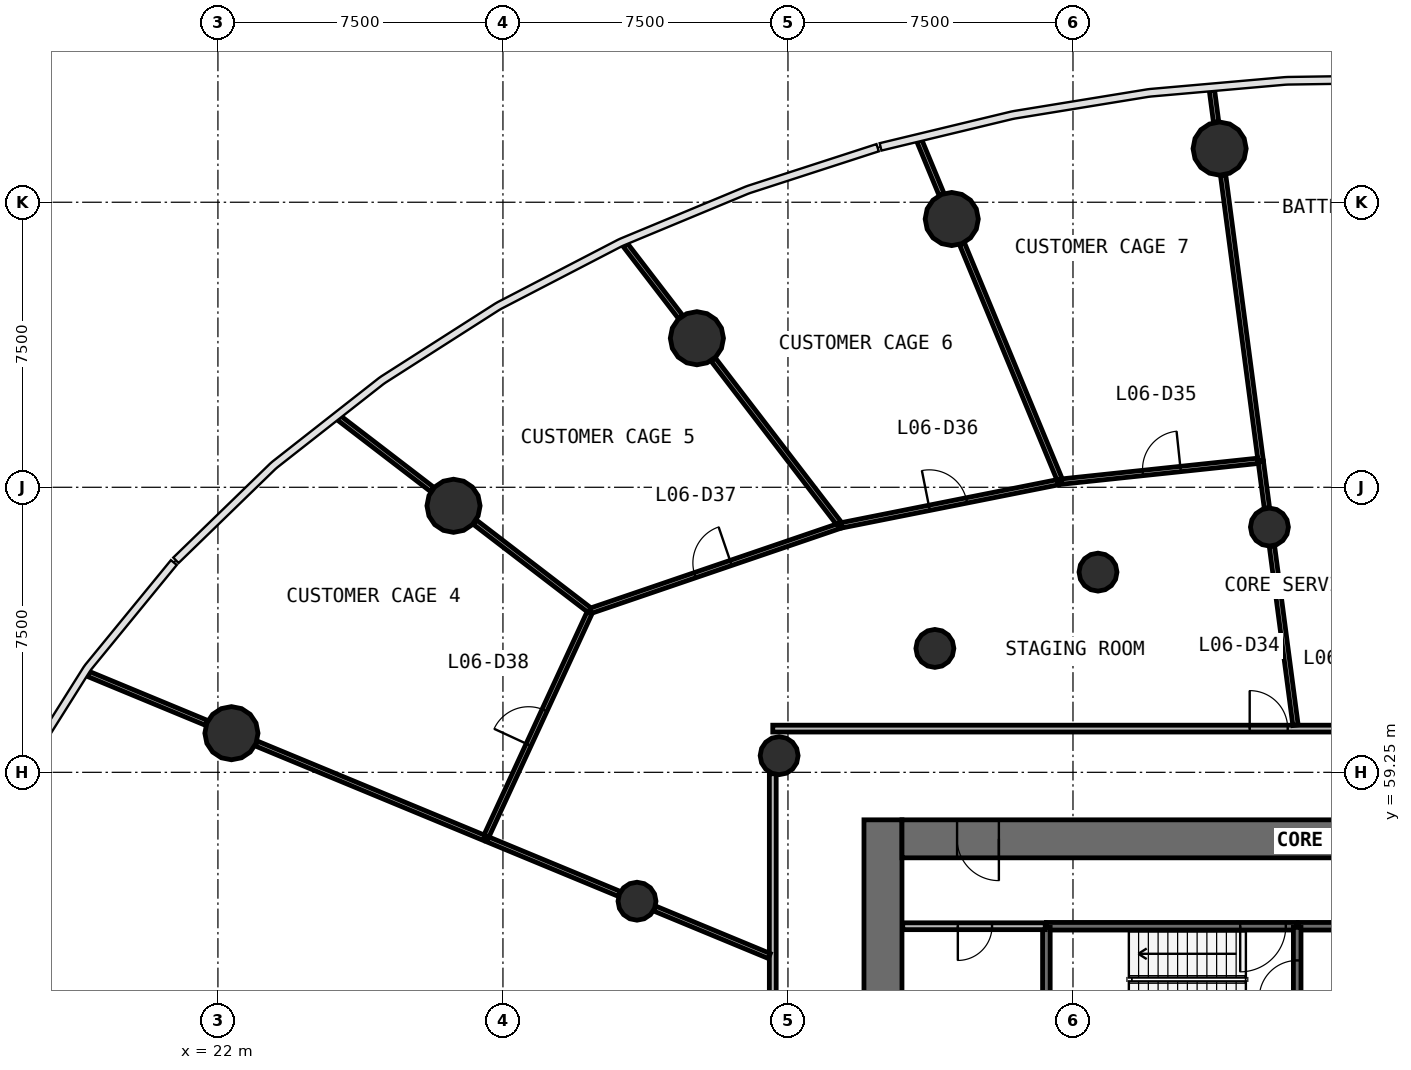
"""IFC4 building model, lengths in metres.
Left out: names, types, materials, properties, quantities, classifications, styles, units other than length and angle.
Written with IfcOpenShell. Run it as: python <this file> out.ifc"""

import sys

from ifc_helpers import new_model, si_unit, direction, frame, frame_2d, origin, origin_2d, place, context, subcontext, project, spatial, rectangle, circle, extrude, source, transform, mapped, element, fill, save


model = new_model("IFC4")
c1 = context("Model", 3, precision=1e-05, world=origin(), true_north=direction((0.0, 1.0)))
c2 = subcontext(c1, "Body", "Model", "MODEL_VIEW")
j1 = project(units=[si_unit("LENGTHUNIT", "METRE"), si_unit("PLANEANGLEUNIT", "RADIAN")], contexts=[c1])
p1 = place(None, origin())
s1 = spatial("IfcSite", under=j1, at=p1, CompositionType="ELEMENT")
p2 = place(p1, origin())
s2 = spatial("IfcBuilding", under=s1, at=p2, CompositionType="ELEMENT")
p3 = place(p2, frame((0.0, 0.0, 27.0)))
s3 = spatial("IfcBuildingStorey", under=s2, at=p3, CompositionType="ELEMENT", Elevation=27.0)
p4 = place(p3, frame((39.5, 58.0, 0.0), z_axis=(0.0, 0.0, 1.0), x_axis=(0.0, -1.0, 0.0)))
e1 = element("IfcWall", 1, at=p4, inside=s3, PredefinedType="SHEAR", context=c2, shape_type="SweptSolid", body=[
    extrude(rectangle(XDim=20.0, YDim=1.0, at=frame_2d((10.0, 0.0))), origin(), (0.0, 0.0, 1.0), 4.4),
])
p5 = place(p4, frame((9.1, 0.0, 0.0)))
e2 = element("IfcOpeningElement", 2, at=p5, cuts=e1, PredefinedType="OPENING", context=c2, shape_type="SweptSolid", body=[
    extrude(rectangle(XDim=1.8, YDim=2.1, at=frame_2d((0.9, 1.05))), frame((0.0, 0.51, 0.0), z_axis=(0.0, -1.0, 0.0), x_axis=(1.0, 0.0, 0.0)), (0.0, 0.0, 1.0), 1.02),
])
p6 = place(p3, frame((64.0, 57.5, 0.0), z_axis=(0.0, 0.0, 1.0), x_axis=(-1.0, 0.0, 0.0)))
e3 = element("IfcWall", 3, at=p6, inside=s3, PredefinedType="SHEAR", context=c2, shape_type="SweptSolid", body=[
    extrude(rectangle(XDim=24.0, YDim=1.0, at=frame_2d((12.0, 0.0))), origin(), (0.0, 0.0, 1.0), 4.4),
])
p7 = place(p6, frame((21.45, 0.0, 0.0)))
e4 = element("IfcOpeningElement", 4, at=p7, cuts=e3, PredefinedType="OPENING", context=c2, shape_type="SweptSolid", body=[
    extrude(rectangle(XDim=1.1, YDim=2.1, at=frame_2d((0.55, 1.05))), frame((0.0, 0.51, 0.0), z_axis=(0.0, -1.0, 0.0), x_axis=(1.0, 0.0, 0.0)), (0.0, 0.0, 1.0), 1.02),
])
p8 = place(p6, frame((1.95, 0.0, 0.0)))
e5 = element("IfcOpeningElement", 5, at=p8, cuts=e3, PredefinedType="OPENING", context=c2, shape_type="SweptSolid", body=[
    extrude(rectangle(XDim=1.1, YDim=2.1, at=frame_2d((0.55, 1.05))), frame((0.0, 0.51, 0.0), z_axis=(0.0, -1.0, 0.0), x_axis=(1.0, 0.0, 0.0)), (0.0, 0.0, 1.0), 1.02),
])
m1 = source(origin(), c2, "Body", "SweptSolid", [
    extrude(circle(Radius=0.7, at=origin_2d()), origin(), (0.0, 0.0, 1.0), 4.4),
])
for number, where, z_axis, x_axis in (
    (6, (48.358, 75.661, 0.0), (0.0, 0.0, 1.0), (1.0, 0.0, 0.0)),
    (7, (41.31, 73.809, 0.0), (0.0, 0.0, 1.0), (1.0, 0.0, 0.0)),
    (8, (34.604, 70.672, 0.0), (0.0, 0.0, 1.0), (1.0, 0.0, 0.0)),
    (9, (28.199, 66.263, 0.0), (0.0, 0.0, 1.0), (1.0, 0.0, 0.0)),
    (10, (22.355, 60.279, 0.0), (0.0, 0.0, 1.0), (1.0, 0.0, 0.0)),
):
    element("IfcColumn", number, at=place(p3, frame(where, z_axis=z_axis, x_axis=x_axis)), inside=s3, PredefinedType="COLUMN", context=c2, shape_type="MappedRepresentation", body=[
        mapped(m1, transform((0.0, 0.0, 0.0), scale=1.0)),
    ])
m2 = source(origin(), c2, "Body", "SweptSolid", [
    extrude(circle(Radius=0.5, at=origin_2d()), origin(), (0.0, 0.0, 1.0), 4.4),
])
for number, where, z_axis, x_axis in (
    (11, (49.669, 65.703, 0.0), (0.0, 0.0, 1.0), (1.0, 0.0, 0.0)),
    (12, (45.158, 64.518, 0.0), (0.0, 0.0, 1.0), (1.0, 0.0, 0.0)),
    (13, (40.866, 62.51, 0.0), (0.0, 0.0, 1.0), (1.0, 0.0, 0.0)),
    (14, (36.768, 59.688, 0.0), (0.0, 0.0, 1.0), (1.0, 0.0, 0.0)),
    (15, (33.028, 55.859, 0.0), (0.0, 0.0, 1.0), (1.0, 0.0, 0.0)),
):
    element("IfcColumn", number, at=place(p3, frame(where, z_axis=z_axis, x_axis=x_axis)), inside=s3, PredefinedType="COLUMN", context=c2, shape_type="MappedRepresentation", body=[
        mapped(m2, transform((0.0, 0.0, 0.0), scale=1.0)),
    ])
p9 = place(p3, frame((50.4, 55.2, 0.0), z_axis=(0.0, 0.0, 1.0), x_axis=(-1.0, 0.0, 0.0)))
e16 = element("IfcWall", 16, at=p9, inside=s3, PredefinedType="SOLIDWALL", context=c2, shape_type="SweptSolid", body=[
    extrude(rectangle(XDim=6.6, YDim=0.2, at=frame_2d((3.3, 0.0))), origin(), (0.0, 0.0, 1.0), 3.95),
])
p10 = place(p9, frame((0.3, 0.0, 0.0)))
e17 = element("IfcOpeningElement", 17, at=p10, cuts=e16, PredefinedType="OPENING", context=c2, shape_type="SweptSolid", body=[
    extrude(rectangle(XDim=1.2, YDim=2.1, at=frame_2d((0.6, 1.05))), frame((0.0, 0.11, 0.0), z_axis=(0.0, -1.0, 0.0), x_axis=(1.0, 0.0, 0.0)), (0.0, 0.0, 1.0), 0.22),
])
p11 = place(p3, frame((56.1, 55.2, 0.0), z_axis=(0.0, 0.0, 1.0), x_axis=(-1.0, 0.0, 0.0)))
e18 = element("IfcWall", 18, at=p11, inside=s3, PredefinedType="SOLIDWALL", context=c2, shape_type="SweptSolid", body=[
    extrude(rectangle(XDim=5.67, YDim=0.2, at=frame_2d((2.835, 0.0))), origin(), (0.0, 0.0, 1.0), 3.95),
])
p12 = place(p11, frame((2.95, 0.0, 0.0)))
e19 = element("IfcOpeningElement", 19, at=p12, cuts=e18, PredefinedType="OPENING", context=c2, shape_type="SweptSolid", body=[
    extrude(rectangle(XDim=1.1, YDim=2.1, at=frame_2d((0.55, 1.05))), frame((0.0, 0.11, 0.0), z_axis=(0.0, -1.0, 0.0), x_axis=(1.0, 0.0, 0.0)), (0.0, 0.0, 1.0), 0.22),
])
p13 = place(p3, frame((50.4, 52.4, 0.0), z_axis=(0.0, 0.0, 1.0), x_axis=(0.0, 1.0, 0.0)))
e20 = element("IfcWall", 20, at=p13, inside=s3, PredefinedType="SOLIDWALL", context=c2, shape_type="SweptSolid", body=[
    extrude(rectangle(XDim=2.77, YDim=0.2, at=frame_2d((1.385, 0.0))), origin(), (0.0, 0.0, 1.0), 3.95),
])
p14 = place(p13, frame((0.9, 0.0, 0.0)))
e21 = element("IfcOpeningElement", 21, at=p14, cuts=e20, PredefinedType="OPENING", context=c2, shape_type="SweptSolid", body=[
    extrude(rectangle(XDim=1.0, YDim=2.1, at=frame_2d((0.5, 1.05))), frame((0.0, 0.11, 0.0), z_axis=(0.0, -1.0, 0.0), x_axis=(1.0, 0.0, 0.0)), (0.0, 0.0, 1.0), 0.22),
])
p15 = place(p3, frame((43.8, 55.17, 0.0), z_axis=(0.0, 0.0, 1.0), x_axis=(0.0, -1.0, 0.0)))
e22 = element("IfcWall", 22, at=p15, inside=s3, PredefinedType="SOLIDWALL", context=c2, shape_type="SweptSolid", body=[
    extrude(rectangle(XDim=2.14, YDim=0.2, at=frame_2d((1.07, 0.0))), origin(), (0.0, 0.0, 1.0), 3.95),
])
p16 = place(p3, frame((36.6, 60.4, 0.0), z_axis=(0.0, 0.0, 1.0), x_axis=(1.0, 0.0, 0.0)))
e23 = element("IfcWall", 23, at=p16, inside=s3, PredefinedType="PARTITIONING", context=c2, shape_type="SweptSolid", body=[
    extrude(rectangle(XDim=30.8, YDim=0.18, at=frame_2d((15.4, 0.0))), origin(), (0.0, 0.0, 1.0), 3.05),
])
p17 = place(p16, frame((17.35, 0.0, 0.0)))
e24 = element("IfcOpeningElement", 24, at=p17, cuts=e23, PredefinedType="OPENING", context=c2, shape_type="SweptSolid", body=[
    extrude(rectangle(XDim=1.0, YDim=2.1, at=frame_2d((0.5, 1.05))), frame((0.0, 0.1, 0.0), z_axis=(0.0, -1.0, 0.0), x_axis=(1.0, 0.0, 0.0)), (0.0, 0.0, 1.0), 0.2),
])
p18 = place(p16, frame((14.95, 0.0, 0.0)))
e25 = element("IfcOpeningElement", 25, at=p18, cuts=e23, PredefinedType="OPENING", context=c2, shape_type="SweptSolid", body=[
    extrude(rectangle(XDim=1.0, YDim=2.1, at=frame_2d((0.5, 1.05))), frame((0.0, 0.1, 0.0), z_axis=(0.0, -1.0, 0.0), x_axis=(1.0, 0.0, 0.0)), (0.0, 0.0, 1.0), 0.2),
])
p19 = place(p16, frame((12.55, 0.0, 0.0)))
e26 = element("IfcOpeningElement", 26, at=p19, cuts=e23, PredefinedType="OPENING", context=c2, shape_type="SweptSolid", body=[
    extrude(rectangle(XDim=1.0, YDim=2.1, at=frame_2d((0.5, 1.05))), frame((0.0, 0.1, 0.0), z_axis=(0.0, -1.0, 0.0), x_axis=(1.0, 0.0, 0.0)), (0.0, 0.0, 1.0), 0.2),
])
p20 = place(p3, frame((36.6, 35.63, 0.0), z_axis=(0.0, 0.0, 1.0), x_axis=(0.0, 1.0, 0.0)))
e27 = element("IfcWall", 27, at=p20, inside=s3, PredefinedType="PARTITIONING", context=c2, shape_type="SweptSolid", body=[
    extrude(rectangle(XDim=23.583, YDim=0.18, at=frame_2d((11.791, 0.0))), origin(), (0.0, 0.0, 1.0), 3.05),
])
p21 = place(p20, frame((11.333, 0.0, 0.0)))
e28 = element("IfcOpeningElement", 28, at=p21, cuts=e27, PredefinedType="OPENING", context=c2, shape_type="SweptSolid", body=[
    extrude(rectangle(XDim=1.0, YDim=2.1, at=frame_2d((0.5, 1.05))), frame((0.0, 0.1, 0.0), z_axis=(0.0, -1.0, 0.0), x_axis=(1.0, 0.0, 0.0)), (0.0, 0.0, 1.0), 0.2),
])
p22 = place(p20, frame((9.133, 0.0, 0.0)))
e29 = element("IfcOpeningElement", 29, at=p22, cuts=e27, PredefinedType="OPENING", context=c2, shape_type="SweptSolid", body=[
    extrude(rectangle(XDim=1.0, YDim=2.1, at=frame_2d((0.5, 1.05))), frame((0.0, 0.1, 0.0), z_axis=(0.0, -1.0, 0.0), x_axis=(1.0, 0.0, 0.0)), (0.0, 0.0, 1.0), 0.2),
])
p23 = place(p3, frame((43.77, 55.2, 0.0), z_axis=(0.0, 0.0, 1.0), x_axis=(-1.0, 0.0, 0.0)))
e30 = element("IfcWall", 30, at=p23, inside=s3, PredefinedType="PARTITIONING", context=c2, shape_type="SweptSolid", body=[
    extrude(rectangle(XDim=3.75, YDim=0.18, at=frame_2d((1.875, 0.0))), origin(), (0.0, 0.0, 1.0), 3.95),
])
p24 = place(p23, frame((1.4, 0.0, 0.0)))
e31 = element("IfcOpeningElement", 31, at=p24, cuts=e30, PredefinedType="OPENING", context=c2, shape_type="SweptSolid", body=[
    extrude(rectangle(XDim=0.9, YDim=2.1, at=frame_2d((0.45, 1.05))), frame((0.0, 0.1, 0.0), z_axis=(0.0, -1.0, 0.0), x_axis=(1.0, 0.0, 0.0)), (0.0, 0.0, 1.0), 0.2),
])
p25 = place(p3, frame((49.439, 67.454, 0.0), z_axis=(0.0, 0.0, 1.0), x_axis=(-0.130518718584, 0.991445845268, 0.0)))
e32 = element("IfcWall", 32, at=p25, inside=s3, PredefinedType="PARTITIONING", context=c2, shape_type="SweptSolid", body=[
    extrude(rectangle(XDim=7.574, YDim=0.14, at=frame_2d((3.787, 0.0))), origin(), (0.0, 0.0, 1.0), 3.05),
])
p26 = place(p3, frame((31.802, 63.498, 0.0), z_axis=(0.0, 0.0, 1.0), x_axis=(0.946437795965, 0.322886200337, 0.0)))
e33 = element("IfcWall", 33, at=p26, inside=s3, PredefinedType="PARTITIONING", context=c2, shape_type="SweptSolid", body=[
    extrude(rectangle(XDim=6.955, YDim=0.14, at=frame_2d((3.478, 0.0))), origin(), (0.0, 0.0, 1.0), 3.05),
])
p27 = place(p26, frame((2.905, 0.0, 0.0)))
e34 = element("IfcOpeningElement", 34, at=p27, cuts=e33, PredefinedType="OPENING", context=c2, shape_type="SweptSolid", body=[
    extrude(rectangle(XDim=1.0, YDim=2.1, at=frame_2d((0.5, 1.05))), frame((0.0, 0.08, 0.0), z_axis=(0.0, -1.0, 0.0), x_axis=(1.0, 0.0, 0.0)), (0.0, 0.0, 1.0), 0.16),
])
p28 = place(p3, frame((44.173, 66.896, 0.0), z_axis=(0.0, 0.0, 1.0), x_axis=(-0.38268058501, 0.923880711919, 0.0)))
e35 = element("IfcWall", 35, at=p28, inside=s3, PredefinedType="PARTITIONING", context=c2, shape_type="SweptSolid", body=[
    extrude(rectangle(XDim=6.777, YDim=0.14, at=frame_2d((3.388, 0.0))), origin(), (0.0, 0.0, 1.0), 3.05),
])
p29 = place(p3, frame((29.037, 57.512, 0.0), z_axis=(0.0, 0.0, 1.0), x_axis=(0.419404841199, 0.907799305562, 0.0)))
e36 = element("IfcWall", 36, at=p29, inside=s3, PredefinedType="PARTITIONING", context=c2, shape_type="SweptSolid", body=[
    extrude(rectangle(XDim=6.564, YDim=0.14, at=frame_2d((3.282, 0.0))), origin(), (0.0, 0.0, 1.0), 3.05),
])
p30 = place(p29, frame((2.715, 0.0, 0.0)))
e37 = element("IfcOpeningElement", 37, at=p30, cuts=e36, PredefinedType="OPENING", context=c2, shape_type="SweptSolid", body=[
    extrude(rectangle(XDim=1.0, YDim=2.1, at=frame_2d((0.5, 1.05))), frame((0.0, 0.08, 0.0), z_axis=(0.0, -1.0, 0.0), x_axis=(1.0, 0.0, 0.0)), (0.0, 0.0, 1.0), 0.16),
])
p31 = place(p3, frame((29.009, 57.523, 0.0), z_axis=(0.0, 0.0, 1.0), x_axis=(-0.923872097861, 0.382701380705, 0.0)))
e38 = element("IfcWall", 38, at=p31, inside=s3, PredefinedType="PARTITIONING", context=c2, shape_type="SweptSolid", body=[
    extrude(rectangle(XDim=6.497, YDim=0.14, at=frame_2d((3.249, 0.0))), origin(), (0.0, 0.0, 1.0), 3.05),
])
p32 = place(p3, frame((38.414, 65.75, 0.0), z_axis=(0.0, 0.0, 1.0), x_axis=(0.980735776519, 0.195339030034, 0.0)))
e39 = element("IfcWall", 39, at=p32, inside=s3, PredefinedType="PARTITIONING", context=c2, shape_type="SweptSolid", body=[
    extrude(rectangle(XDim=5.801, YDim=0.14, at=frame_2d((2.9, 0.0))), origin(), (0.0, 0.0, 1.0), 3.05),
])
p33 = place(p32, frame((2.351, 0.0, 0.0)))
e40 = element("IfcOpeningElement", 40, at=p33, cuts=e39, PredefinedType="OPENING", context=c2, shape_type="SweptSolid", body=[
    extrude(rectangle(XDim=1.0, YDim=2.1, at=frame_2d((0.5, 1.05))), frame((0.0, 0.08, 0.0), z_axis=(0.0, -1.0, 0.0), x_axis=(1.0, 0.0, 0.0)), (0.0, 0.0, 1.0), 0.16),
])
p34 = place(p3, frame((38.34, 65.802, 0.0), z_axis=(0.0, 0.0, 1.0), x_axis=(-0.608763541662, 0.793351719191, 0.0)))
e41 = element("IfcWall", 41, at=p34, inside=s3, PredefinedType="PARTITIONING", context=c2, shape_type="SweptSolid", body=[
    extrude(rectangle(XDim=5.433, YDim=0.14, at=frame_2d((2.717, 0.0))), origin(), (0.0, 0.0, 1.0), 3.05),
])
p35 = place(p3, frame((44.203, 66.9, 0.0), z_axis=(0.0, 0.0, 1.0), x_axis=(0.994449435574, 0.105215588614, 0.0)))
e42 = element("IfcWall", 42, at=p35, inside=s3, PredefinedType="PARTITIONING", context=c2, shape_type="SweptSolid", body=[
    extrude(rectangle(XDim=5.195, YDim=0.14, at=frame_2d((2.598, 0.0))), origin(), (0.0, 0.0, 1.0), 3.05),
])
p36 = place(p35, frame((2.146, 0.0, 0.0)))
e43 = element("IfcOpeningElement", 43, at=p36, cuts=e42, PredefinedType="OPENING", context=c2, shape_type="SweptSolid", body=[
    extrude(rectangle(XDim=1.0, YDim=2.1, at=frame_2d((0.5, 1.05))), frame((0.0, 0.08, 0.0), z_axis=(0.0, -1.0, 0.0), x_axis=(1.0, 0.0, 0.0)), (0.0, 0.0, 1.0), 0.16),
])
p37 = place(p3, frame((50.356, 60.49, 0.0), z_axis=(0.0, 0.0, 1.0), x_axis=(-0.130548834981, 0.991441880135, 0.0)))
e44 = element("IfcWall", 44, at=p37, inside=s3, PredefinedType="PARTITIONING", context=c2, shape_type="SweptSolid", body=[
    extrude(rectangle(XDim=4.754, YDim=0.14, at=frame_2d((2.377, 0.0))), origin(), (0.0, 0.0, 1.0), 3.05),
])
p38 = place(p3, frame((31.779, 63.517, 0.0), z_axis=(0.0, 0.0, 1.0), x_axis=(-0.793395753835, 0.608706150615, 0.0)))
e45 = element("IfcWall", 45, at=p38, inside=s3, PredefinedType="PARTITIONING", context=c2, shape_type="SweptSolid", body=[
    extrude(rectangle(XDim=3.807, YDim=0.14, at=frame_2d((1.904, 0.0))), origin(), (0.0, 0.0, 1.0), 3.05),
])
p39 = place(p3, frame((32.561, 56.052, 0.0), z_axis=(0.0, 0.0, 1.0), x_axis=(-0.923888895389, 0.382660827596, 0.0)))
e46 = element("IfcWall", 46, at=p39, inside=s3, PredefinedType="PARTITIONING", context=c2, shape_type="SweptSolid", body=[
    extrude(rectangle(XDim=3.744, YDim=0.14, at=frame_2d((1.872, 0.0))), origin(), (0.0, 0.0, 1.0), 3.05),
])
p40 = place(p3, frame((21.704, 60.549, 0.0), z_axis=(0.0, 0.0, 1.0), x_axis=(-0.923894038604, 0.382648409681, 0.0)))
e47 = element("IfcWall", 47, at=p40, inside=s3, PredefinedType="PARTITIONING", context=c2, shape_type="SweptSolid", body=[
    extrude(rectangle(XDim=3.368, YDim=0.14, at=frame_2d((1.684, 0.0))), origin(), (0.0, 0.0, 1.0), 3.05),
])
p41 = place(p3, frame((36.51, 54.416, 0.0), z_axis=(0.0, 0.0, 1.0), x_axis=(-0.923911109142, 0.382607190737, 0.0)))
e48 = element("IfcWall", 48, at=p41, inside=s3, PredefinedType="PARTITIONING", context=c2, shape_type="SweptSolid", body=[
    extrude(rectangle(XDim=3.264, YDim=0.14, at=frame_2d((1.632, 0.0))), origin(), (0.0, 0.0, 1.0), 3.05),
])
p42 = place(p3, frame((27.641, 66.691, 0.0), z_axis=(0.0, 0.0, 1.0), x_axis=(-0.793319039327, 0.608806128288, 0.0)))
e49 = element("IfcWall", 49, at=p42, inside=s3, PredefinedType="PARTITIONING", context=c2, shape_type="SweptSolid", body=[
    extrude(rectangle(XDim=3.105, YDim=0.14, at=frame_2d((1.553, 0.0))), origin(), (0.0, 0.0, 1.0), 3.05),
])
p43 = place(p3, frame((34.175, 71.23, 0.0), z_axis=(0.0, 0.0, 1.0), x_axis=(-0.608785845346, 0.793334604379, 0.0)))
e50 = element("IfcWall", 50, at=p43, inside=s3, PredefinedType="PARTITIONING", context=c2, shape_type="SweptSolid", body=[
    extrude(rectangle(XDim=2.386, YDim=0.14, at=frame_2d((1.193, 0.0))), origin(), (0.0, 0.0, 1.0), 3.05),
])
p44 = place(p3, frame((41.04, 74.46, 0.0), z_axis=(0.0, 0.0, 1.0), x_axis=(-0.382521566015, 0.923946563138, 0.0)))
e51 = element("IfcWall", 51, at=p44, inside=s3, PredefinedType="PARTITIONING", context=c2, shape_type="SweptSolid", body=[
    extrude(rectangle(XDim=1.524, YDim=0.14, at=frame_2d((0.762, 0.0))), origin(), (0.0, 0.0, 1.0), 3.05),
])
p45 = place(p3, frame((49.604, 66.203, 0.0), z_axis=(0.0, 0.0, 1.0), x_axis=(-0.130449384216, 0.991454970313, 0.0)))
e52 = element("IfcWall", 52, at=p45, inside=s3, PredefinedType="PARTITIONING", context=c2, shape_type="SweptSolid", body=[
    extrude(rectangle(XDim=1.231, YDim=0.14, at=frame_2d((0.616, 0.0))), origin(), (0.0, 0.0, 1.0), 3.05),
])
p46 = place(p3, frame((48.266, 76.36, 0.0), z_axis=(0.0, 0.0, 1.0), x_axis=(-0.130342122338, 0.991469077251, 0.0)))
e53 = element("IfcWall", 53, at=p46, inside=s3, PredefinedType="PARTITIONING", context=c2, shape_type="SweptSolid", body=[
    extrude(rectangle(XDim=0.843, YDim=0.14, at=frame_2d((0.421, 0.0))), origin(), (0.0, 0.0, 1.0), 3.05),
])
m3 = source(origin(), c2, "Body", "SweptSolid", [
    extrude(rectangle(XDim=1.2, YDim=2.1, at=frame_2d((0.6, 1.05))), frame((0.0, 0.025, 0.0), z_axis=(0.0, -1.0, 0.0), x_axis=(1.0, 0.0, 0.0)), (0.0, 0.0, 1.0), 0.05),
])
p47 = place(p10, origin())
e54 = element("IfcDoor", 54, at=p47, inside=s3, OperationType="SINGLE_SWING_RIGHT", PredefinedType="DOOR", context=c2, shape_type="MappedRepresentation", body=[
    mapped(m3, transform((0.0, 0.0, 0.0), scale=1.0)),
])
fill(e17, e54)
m4 = source(origin(), c2, "Body", "SweptSolid", [
    extrude(rectangle(XDim=1.0, YDim=2.1, at=frame_2d((0.5, 1.05))), frame((0.0, 0.025, 0.0), z_axis=(0.0, -1.0, 0.0), x_axis=(1.0, 0.0, 0.0)), (0.0, 0.0, 1.0), 0.05),
])
p48 = place(p14, origin())
e55 = element("IfcDoor", 55, at=p48, inside=s3, OperationType="SINGLE_SWING_LEFT", PredefinedType="DOOR", context=c2, shape_type="MappedRepresentation", body=[
    mapped(m4, transform((0.0, 0.0, 0.0), scale=1.0)),
])
fill(e21, e55)
m5 = source(origin(), c2, "Body", "SweptSolid", [
    extrude(rectangle(XDim=1.1, YDim=2.1, at=frame_2d((0.55, 1.05))), frame((0.0, 0.025, 0.0), z_axis=(0.0, -1.0, 0.0), x_axis=(1.0, 0.0, 0.0)), (0.0, 0.0, 1.0), 0.05),
])
p49 = place(p7, origin())
e56 = element("IfcDoor", 56, at=p49, inside=s3, OperationType="SINGLE_SWING_LEFT", PredefinedType="DOOR", context=c2, shape_type="MappedRepresentation", body=[
    mapped(m5, transform((0.0, 0.0, 0.0), scale=1.0)),
])
fill(e4, e56)
m6 = source(origin(), c2, "Body", "SweptSolid", [
    extrude(rectangle(XDim=1.0, YDim=2.1, at=frame_2d((0.5, 1.05))), frame((0.0, 0.025, 0.0), z_axis=(0.0, -1.0, 0.0), x_axis=(1.0, 0.0, 0.0)), (0.0, 0.0, 1.0), 0.05),
])
p50 = place(p19, origin())
e57 = element("IfcDoor", 57, at=p50, inside=s3, OperationType="SINGLE_SWING_LEFT", PredefinedType="DOOR", context=c2, shape_type="MappedRepresentation", body=[
    mapped(m6, transform((0.0, 0.0, 0.0), scale=1.0)),
])
fill(e26, e57)
p51 = place(p36, origin())
e58 = element("IfcDoor", 58, at=p51, inside=s3, OperationType="SINGLE_SWING_RIGHT", PredefinedType="DOOR", context=c2, shape_type="MappedRepresentation", body=[
    mapped(m6, transform((0.0, 0.0, 0.0), scale=1.0)),
])
fill(e43, e58)
p52 = place(p33, origin())
e59 = element("IfcDoor", 59, at=p52, inside=s3, OperationType="SINGLE_SWING_LEFT", PredefinedType="DOOR", context=c2, shape_type="MappedRepresentation", body=[
    mapped(m6, transform((0.0, 0.0, 0.0), scale=1.0)),
])
fill(e40, e59)
p53 = place(p27, origin())
e60 = element("IfcDoor", 60, at=p53, inside=s3, OperationType="SINGLE_SWING_RIGHT", PredefinedType="DOOR", context=c2, shape_type="MappedRepresentation", body=[
    mapped(m6, transform((0.0, 0.0, 0.0), scale=1.0)),
])
fill(e34, e60)
p54 = place(p30, origin())
e61 = element("IfcDoor", 61, at=p54, inside=s3, OperationType="SINGLE_SWING_LEFT", PredefinedType="DOOR", context=c2, shape_type="MappedRepresentation", body=[
    mapped(m6, transform((0.0, 0.0, 0.0), scale=1.0)),
])
fill(e37, e61)
m7 = source(origin(), c2, "Body", "SweptSolid", [
    extrude(rectangle(XDim=0.9, YDim=2.1, at=frame_2d((0.45, 1.05))), frame((0.0, 0.025, 0.0), z_axis=(0.0, -1.0, 0.0), x_axis=(1.0, 0.0, 0.0)), (0.0, 0.0, 1.0), 0.05),
])
p55 = place(p24, origin())
e62 = element("IfcDoor", 62, at=p55, inside=s3, OperationType="SINGLE_SWING_RIGHT", PredefinedType="DOOR", context=c2, shape_type="MappedRepresentation", body=[
    mapped(m7, transform((0.0, 0.0, 0.0), scale=1.0)),
])
fill(e31, e62)
save(model, sys.argv[1])
